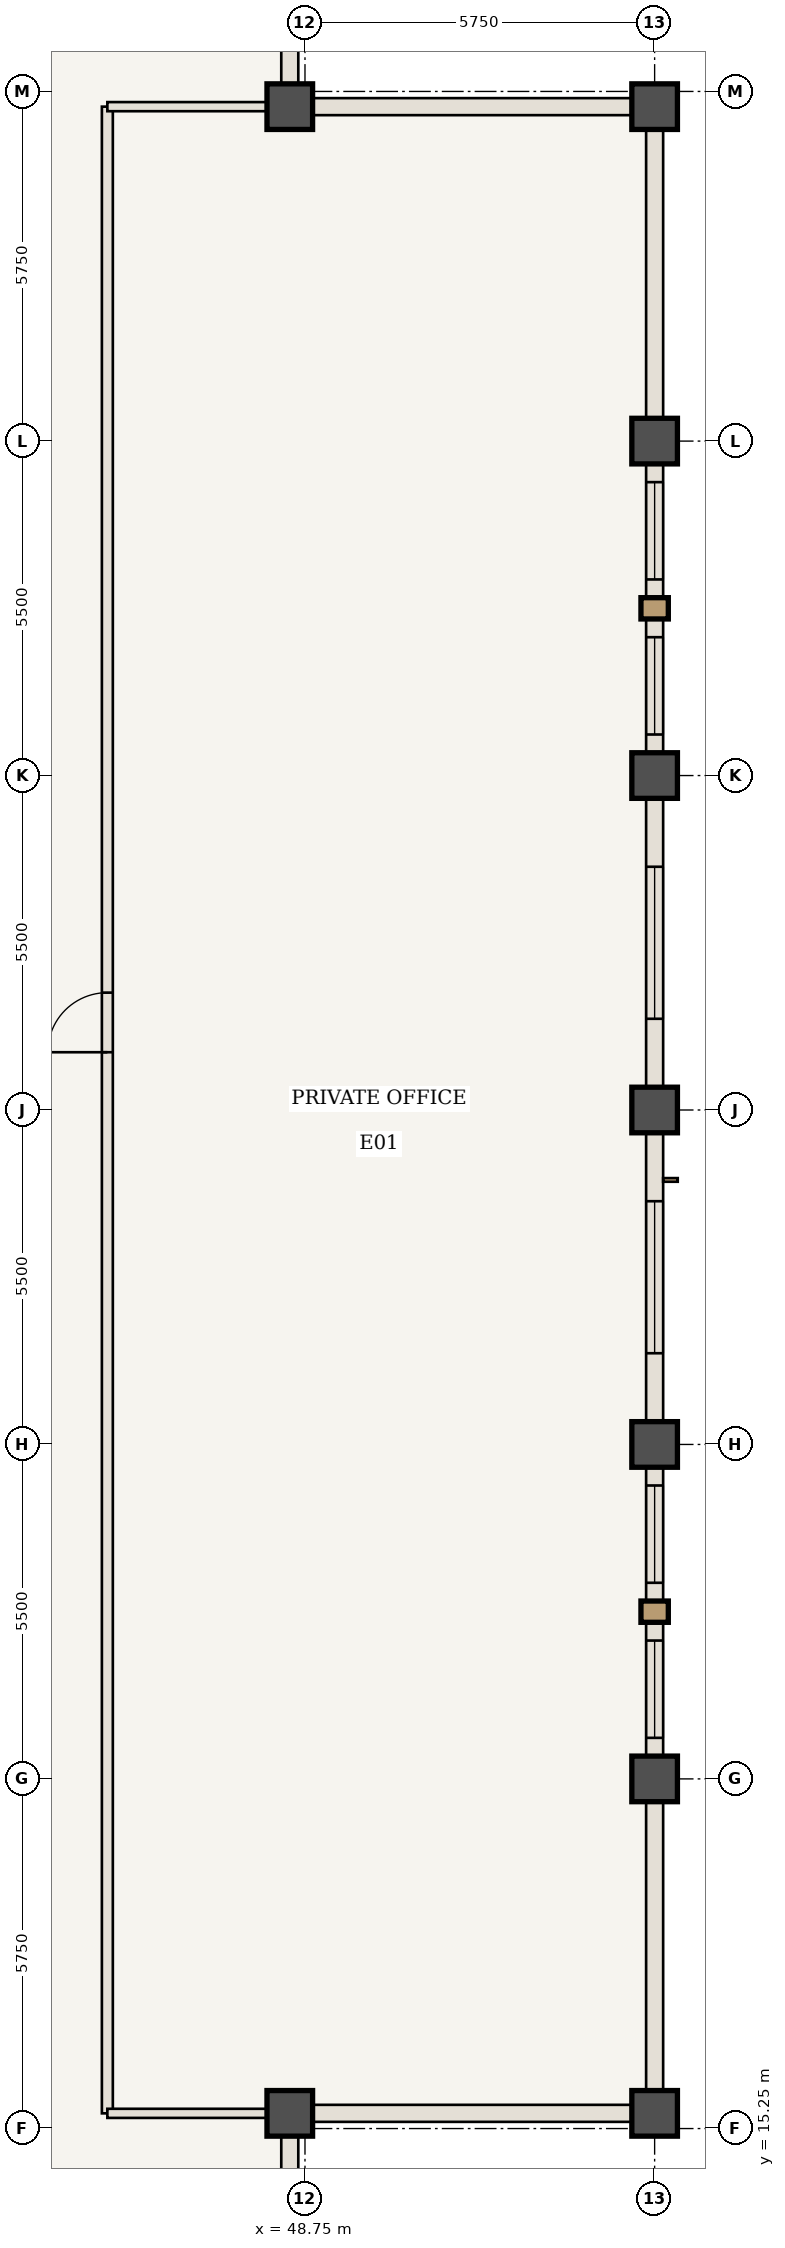
"""IFC4 building model, lengths in metres.
Left out: names, types, materials, properties, quantities, classifications, styles, units other than length and angle.
Written with IfcOpenShell. Run it as: python <this file> out.ifc"""

import sys

from ifc_helpers import new_model, si_unit, direction, frame, frame_2d, origin, origin_2d, place, context, subcontext, project, spatial, rectangle, extrude, element, fill, save


model = new_model("IFC4")
c1 = context("Model", 3, precision=1e-05, world=origin(), true_north=direction((0.0, 1.0)))
c2 = subcontext(c1, "Body", "Model", "MODEL_VIEW")
j1 = project(units=[si_unit("LENGTHUNIT", "METRE"), si_unit("PLANEANGLEUNIT", "RADIAN")], contexts=[c1])
p1 = place(None, origin())
s1 = spatial("IfcSite", under=j1, at=p1, CompositionType="ELEMENT")
p2 = place(p1, origin())
s2 = spatial("IfcBuilding", under=s1, at=p2, CompositionType="ELEMENT")
p3 = place(p2, frame((0.0, 0.0, 300.65)))
s3 = spatial("IfcBuildingStorey", under=s2, at=p3, CompositionType="ELEMENT", Elevation=300.65)
for number, where, z_axis, x_axis in (
    (1, (48.5, 15.5, 0.0), (0.0, 0.0, 1.0), (1.0, 0.0, 0.0)),
    (2, (54.5, 15.5, 0.0), (0.0, 0.0, 1.0), (1.0, 0.0, 0.0)),
    (3, (54.5, 48.5, 0.0), (0.0, 0.0, 1.0), (1.0, 0.0, 0.0)),
    (4, (48.5, 48.5, 0.0), (0.0, 0.0, 1.0), (1.0, 0.0, 0.0)),
    (5, (54.5, 21.0, 0.0), (0.0, 0.0, 1.0), (1.0, 0.0, 0.0)),
    (6, (54.5, 26.5, 0.0), (0.0, 0.0, 1.0), (1.0, 0.0, 0.0)),
    (7, (54.5, 32.0, 0.0), (0.0, 0.0, 1.0), (1.0, 0.0, 0.0)),
    (8, (54.5, 37.5, 0.0), (0.0, 0.0, 1.0), (1.0, 0.0, 0.0)),
    (9, (54.5, 43.0, 0.0), (0.0, 0.0, 1.0), (1.0, 0.0, 0.0)),
):
    element("IfcColumn", number, at=place(p3, frame(where, z_axis=z_axis, x_axis=x_axis)), inside=s3, PredefinedType="COLUMN", context=c2, shape_type="SweptSolid", body=[
        extrude(rectangle(XDim=0.75, YDim=0.75, at=origin_2d()), origin(), (0.0, 0.0, 1.0), 3.85),
    ])
p4 = place(p3, frame((45.5, 15.5, 0.0), z_axis=(0.0, 0.0, 1.0), x_axis=(0.0, 1.0, 0.0)))
e10 = element("IfcWall", 10, at=p4, inside=s3, PredefinedType="STANDARD", context=c2, shape_type="SweptSolid", body=[
    extrude(rectangle(XDim=33.0, YDim=0.18, at=frame_2d((16.5, 0.0))), origin(), (0.0, 0.0, 1.0), 3.685),
])
p5 = place(p4, frame((17.45, 0.0, 0.0)))
e11 = element("IfcOpeningElement", 11, at=p5, cuts=e10, PredefinedType="OPENING", context=c2, shape_type="SweptSolid", body=[
    extrude(rectangle(XDim=0.98, YDim=2.2, at=frame_2d((0.49, 1.1))), frame((0.0, 0.1, 0.0), z_axis=(0.0, -1.0, 0.0), x_axis=(1.0, 0.0, 0.0)), (0.0, 0.0, 1.0), 0.2),
])
for number, where, z_axis, x_axis in (
    (12, (45.5, 15.5, 0.0), (0.0, 0.0, 1.0), (1.0, 0.0, 0.0)),
    (13, (45.5, 48.5, 0.0), (0.0, 0.0, 1.0), (1.0, 0.0, 0.0)),
):
    element("IfcWall", number, at=place(p3, frame(where, z_axis=z_axis, x_axis=x_axis)), inside=s3, PredefinedType="STANDARD", context=c2, shape_type="SweptSolid", body=[
        extrude(rectangle(XDim=3.0, YDim=0.15, at=frame_2d((1.5, 0.0))), origin(), (0.0, 0.0, 1.0), 3.685),
    ])
p6 = place(p3, frame((54.5, 21.0, 0.0), z_axis=(0.0, 0.0, 1.0), x_axis=(0.0, -1.0, 0.0)))
e14 = element("IfcWall", 14, at=p6, inside=s3, PredefinedType="USERDEFINED", context=c2, shape_type="SweptSolid", body=[
    extrude(rectangle(XDim=5.5, YDim=0.28, at=frame_2d((2.75, 0.0))), origin(), (0.0, 0.0, 1.0), 2.985),
])
p7 = place(p3, frame((54.5, 26.5, 0.0), z_axis=(0.0, 0.0, 1.0), x_axis=(0.0, -1.0, 0.0)))
e15 = element("IfcWall", 15, at=p7, inside=s3, PredefinedType="USERDEFINED", context=c2, shape_type="SweptSolid", body=[
    extrude(rectangle(XDim=5.5, YDim=0.28, at=frame_2d((2.75, 0.0))), origin(), (0.0, 0.0, 1.0), 2.985),
])
p8 = place(p7, frame((0.675, 0.0, 0.85)))
e16 = element("IfcOpeningElement", 16, at=p8, cuts=e15, PredefinedType="OPENING", context=c2, shape_type="SweptSolid", body=[
    extrude(rectangle(XDim=1.6, YDim=1.935, at=frame_2d((0.8, 0.968))), frame((0.0, 0.15, 0.0), z_axis=(0.0, -1.0, 0.0), x_axis=(1.0, 0.0, 0.0)), (0.0, 0.0, 1.0), 0.3),
])
p9 = place(p7, frame((3.225, 0.0, 0.85)))
e17 = element("IfcOpeningElement", 17, at=p9, cuts=e15, PredefinedType="OPENING", context=c2, shape_type="SweptSolid", body=[
    extrude(rectangle(XDim=1.6, YDim=1.935, at=frame_2d((0.8, 0.968))), frame((0.0, 0.15, 0.0), z_axis=(0.0, -1.0, 0.0), x_axis=(1.0, 0.0, 0.0)), (0.0, 0.0, 1.0), 0.3),
])
p10 = place(p3, frame((54.5, 32.0, 0.0), z_axis=(0.0, 0.0, 1.0), x_axis=(0.0, -1.0, 0.0)))
e18 = element("IfcWall", 18, at=p10, inside=s3, PredefinedType="USERDEFINED", context=c2, shape_type="SweptSolid", body=[
    extrude(rectangle(XDim=5.5, YDim=0.28, at=frame_2d((2.75, 0.0))), origin(), (0.0, 0.0, 1.0), 2.985),
])
p11 = place(p10, frame((1.5, 0.0, 0.85)))
e19 = element("IfcOpeningElement", 19, at=p11, cuts=e18, PredefinedType="OPENING", context=c2, shape_type="SweptSolid", body=[
    extrude(rectangle(XDim=2.5, YDim=1.935, at=frame_2d((1.25, 0.968))), frame((0.0, 0.15, 0.0), z_axis=(0.0, -1.0, 0.0), x_axis=(1.0, 0.0, 0.0)), (0.0, 0.0, 1.0), 0.3),
])
p12 = place(p3, frame((54.5, 37.5, 0.0), z_axis=(0.0, 0.0, 1.0), x_axis=(0.0, -1.0, 0.0)))
e20 = element("IfcWall", 20, at=p12, inside=s3, PredefinedType="USERDEFINED", context=c2, shape_type="SweptSolid", body=[
    extrude(rectangle(XDim=5.5, YDim=0.28, at=frame_2d((2.75, 0.0))), origin(), (0.0, 0.0, 1.0), 2.985),
])
p13 = place(p12, frame((1.5, 0.0, 0.85)))
e21 = element("IfcOpeningElement", 21, at=p13, cuts=e20, PredefinedType="OPENING", context=c2, shape_type="SweptSolid", body=[
    extrude(rectangle(XDim=2.5, YDim=1.935, at=frame_2d((1.25, 0.968))), frame((0.0, 0.15, 0.0), z_axis=(0.0, -1.0, 0.0), x_axis=(1.0, 0.0, 0.0)), (0.0, 0.0, 1.0), 0.3),
])
p14 = place(p3, frame((54.5, 43.0, 0.0), z_axis=(0.0, 0.0, 1.0), x_axis=(0.0, -1.0, 0.0)))
e22 = element("IfcWall", 22, at=p14, inside=s3, PredefinedType="USERDEFINED", context=c2, shape_type="SweptSolid", body=[
    extrude(rectangle(XDim=5.5, YDim=0.28, at=frame_2d((2.75, 0.0))), origin(), (0.0, 0.0, 1.0), 2.985),
])
p15 = place(p14, frame((0.675, 0.0, 0.85)))
e23 = element("IfcOpeningElement", 23, at=p15, cuts=e22, PredefinedType="OPENING", context=c2, shape_type="SweptSolid", body=[
    extrude(rectangle(XDim=1.6, YDim=1.935, at=frame_2d((0.8, 0.968))), frame((0.0, 0.15, 0.0), z_axis=(0.0, -1.0, 0.0), x_axis=(1.0, 0.0, 0.0)), (0.0, 0.0, 1.0), 0.3),
])
p16 = place(p14, frame((3.225, 0.0, 0.85)))
e24 = element("IfcOpeningElement", 24, at=p16, cuts=e22, PredefinedType="OPENING", context=c2, shape_type="SweptSolid", body=[
    extrude(rectangle(XDim=1.6, YDim=1.935, at=frame_2d((0.8, 0.968))), frame((0.0, 0.15, 0.0), z_axis=(0.0, -1.0, 0.0), x_axis=(1.0, 0.0, 0.0)), (0.0, 0.0, 1.0), 0.3),
])
p17 = place(p3, frame((54.5, 48.5, 0.0), z_axis=(0.0, 0.0, 1.0), x_axis=(0.0, -1.0, 0.0)))
e25 = element("IfcWall", 25, at=p17, inside=s3, PredefinedType="USERDEFINED", context=c2, shape_type="SweptSolid", body=[
    extrude(rectangle(XDim=5.5, YDim=0.28, at=frame_2d((2.75, 0.0))), origin(), (0.0, 0.0, 1.0), 2.985),
])
for number, where, z_axis, x_axis in (
    (26, (48.5, 15.5, 0.0), (0.0, 0.0, 1.0), (0.0, -1.0, 0.0)),
    (27, (54.5, 15.5, 0.0), (0.0, 0.0, 1.0), (-1.0, 0.0, 0.0)),
    (28, (48.5, 48.5, 0.0), (0.0, 0.0, 1.0), (1.0, 0.0, 0.0)),
    (29, (48.5, 54.5, 0.0), (0.0, 0.0, 1.0), (0.0, -1.0, 0.0)),
):
    element("IfcWall", number, at=place(p3, frame(where, z_axis=z_axis, x_axis=x_axis)), inside=s3, PredefinedType="USERDEFINED", context=c2, shape_type="SweptSolid", body=[
        extrude(rectangle(XDim=6.0, YDim=0.28, at=frame_2d((3.0, 0.0))), origin(), (0.0, 0.0, 1.0), 2.985),
    ])
p18 = place(p5, origin())
e30 = element("IfcDoor", 30, at=p18, inside=s3, OperationType="SINGLE_SWING_LEFT", PredefinedType="DOOR", context=c2, shape_type="SweptSolid", body=[
    extrude(rectangle(XDim=0.98, YDim=2.2, at=frame_2d((0.49, 1.1))), frame((0.0, 0.025, 0.0), z_axis=(0.0, -1.0, 0.0), x_axis=(1.0, 0.0, 0.0)), (0.0, 0.0, 1.0), 0.05),
])
fill(e11, e30)
p19 = place(p8, origin())
e31 = element("IfcWindow", 31, at=p19, inside=s3, PartitioningType="SINGLE_PANEL", PredefinedType="WINDOW", context=c2, shape_type="SweptSolid", body=[
    extrude(rectangle(XDim=1.6, YDim=1.935, at=frame_2d((0.8, 0.968))), frame((0.0, 0.03, 0.0), z_axis=(0.0, -1.0, 0.0), x_axis=(1.0, 0.0, 0.0)), (0.0, 0.0, 1.0), 0.06),
])
fill(e16, e31)
p20 = place(p9, origin())
e32 = element("IfcWindow", 32, at=p20, inside=s3, PartitioningType="SINGLE_PANEL", PredefinedType="WINDOW", context=c2, shape_type="SweptSolid", body=[
    extrude(rectangle(XDim=1.6, YDim=1.935, at=frame_2d((0.8, 0.968))), frame((0.0, 0.03, 0.0), z_axis=(0.0, -1.0, 0.0), x_axis=(1.0, 0.0, 0.0)), (0.0, 0.0, 1.0), 0.06),
])
fill(e17, e32)
p21 = place(p11, origin())
e33 = element("IfcWindow", 33, at=p21, inside=s3, PartitioningType="SINGLE_PANEL", PredefinedType="WINDOW", context=c2, shape_type="SweptSolid", body=[
    extrude(rectangle(XDim=2.5, YDim=1.935, at=frame_2d((1.25, 0.968))), frame((0.0, 0.03, 0.0), z_axis=(0.0, -1.0, 0.0), x_axis=(1.0, 0.0, 0.0)), (0.0, 0.0, 1.0), 0.06),
])
fill(e19, e33)
p22 = place(p13, origin())
e34 = element("IfcWindow", 34, at=p22, inside=s3, PartitioningType="SINGLE_PANEL", PredefinedType="WINDOW", context=c2, shape_type="SweptSolid", body=[
    extrude(rectangle(XDim=2.5, YDim=1.935, at=frame_2d((1.25, 0.968))), frame((0.0, 0.03, 0.0), z_axis=(0.0, -1.0, 0.0), x_axis=(1.0, 0.0, 0.0)), (0.0, 0.0, 1.0), 0.06),
])
fill(e21, e34)
p23 = place(p15, origin())
e35 = element("IfcWindow", 35, at=p23, inside=s3, PartitioningType="SINGLE_PANEL", PredefinedType="WINDOW", context=c2, shape_type="SweptSolid", body=[
    extrude(rectangle(XDim=1.6, YDim=1.935, at=frame_2d((0.8, 0.968))), frame((0.0, 0.03, 0.0), z_axis=(0.0, -1.0, 0.0), x_axis=(1.0, 0.0, 0.0)), (0.0, 0.0, 1.0), 0.06),
])
fill(e23, e35)
p24 = place(p16, origin())
e36 = element("IfcWindow", 36, at=p24, inside=s3, PartitioningType="SINGLE_PANEL", PredefinedType="WINDOW", context=c2, shape_type="SweptSolid", body=[
    extrude(rectangle(XDim=1.6, YDim=1.935, at=frame_2d((0.8, 0.968))), frame((0.0, 0.03, 0.0), z_axis=(0.0, -1.0, 0.0), x_axis=(1.0, 0.0, 0.0)), (0.0, 0.0, 1.0), 0.06),
])
fill(e24, e36)
save(model, sys.argv[1])
